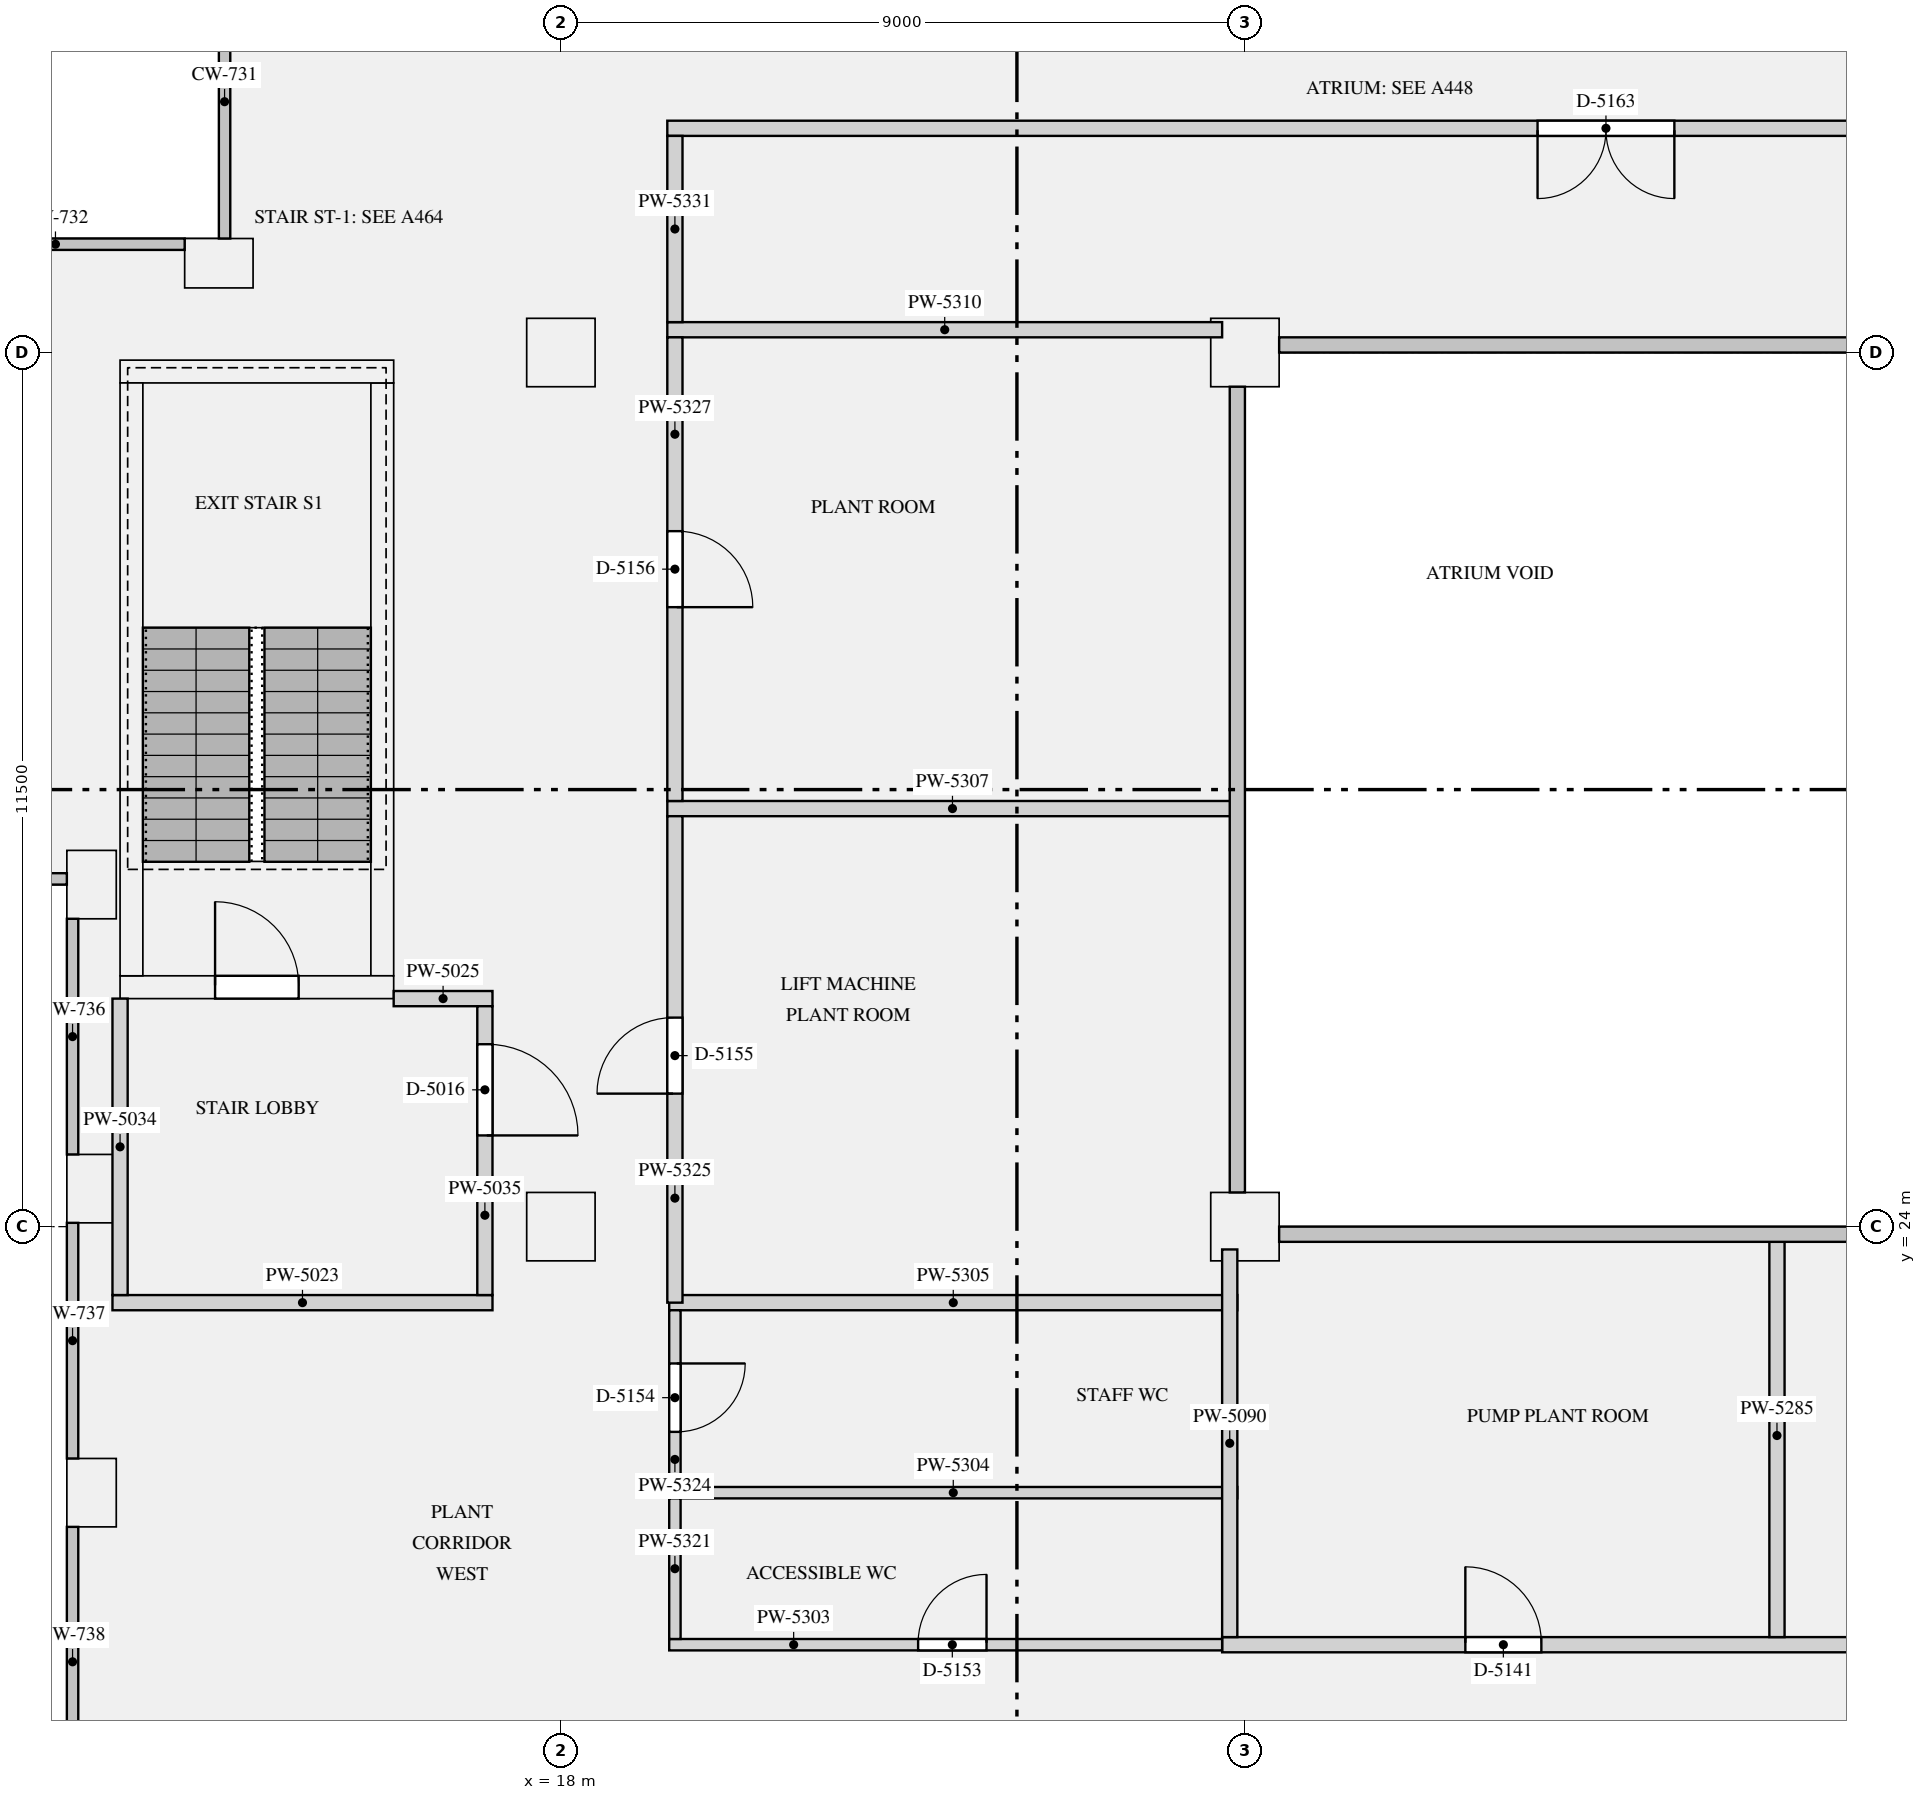
"""IFC4 building model, lengths in metres.
Left out: names, types, materials, properties, quantities, classifications, styles, units other than length and angle.
Written with IfcOpenShell. Run it as: python <this file> out.ifc"""

import sys

from ifc_helpers import new_model, si_unit, direction, frame, frame_2d, origin, origin_2d, place, context, subcontext, project, spatial, rectangle, extrude, element, fill, save


model = new_model("IFC4")
c1 = context("Model", 3, precision=1e-05, world=origin(), true_north=direction((0.0, 1.0)))
c2 = subcontext(c1, "Body", "Model", "MODEL_VIEW")
j1 = project(units=[si_unit("LENGTHUNIT", "METRE"), si_unit("PLANEANGLEUNIT", "RADIAN")], contexts=[c1])
p1 = place(None, origin())
s1 = spatial("IfcSite", under=j1, at=p1, CompositionType="ELEMENT")
p2 = place(p1, origin())
s2 = spatial("IfcBuilding", under=s1, at=p2, CompositionType="ELEMENT")
p3 = place(p2, frame((0.0, 0.0, 235.8)))
s3 = spatial("IfcBuildingStorey", under=s2, at=p3, CompositionType="ELEMENT", Elevation=235.8)
for number, where, z_axis, x_axis in (
    (1, (13.5, 36.675, 0.0), (0.0, 0.0, 1.0), (-1.0, 0.0, 0.0)),
    (2, (11.825, 28.5, 0.0), (0.0, 0.0, 1.0), (0.0, -1.0, 0.0)),
    (3, (11.825, 24.5, 0.0), (0.0, 0.0, 1.0), (0.0, -1.0, 0.0)),
    (4, (11.825, 20.5, 0.0), (0.0, 0.0, 1.0), (0.0, -1.0, 0.0)),
):
    element("IfcColumn", number, at=place(p3, frame(where, z_axis=z_axis, x_axis=x_axis)), inside=s3, PredefinedType="USERDEFINED", context=c2, shape_type="SweptSolid", body=[
        extrude(rectangle(XDim=0.9, YDim=0.65, at=origin_2d()), origin(), (0.0, 0.0, 1.0), 4.2),
    ])
for number, where, z_axis, x_axis in (
    (5, (18.0, 24.0, 0.0), (0.0, 0.0, 1.0), (1.0, 0.0, 0.0)),
    (6, (27.0, 24.0, 0.0), (0.0, 0.0, 1.0), (1.0, 0.0, 0.0)),
    (7, (18.0, 35.5, 0.0), (0.0, 0.0, 1.0), (1.0, 0.0, 0.0)),
    (8, (27.0, 35.5, 0.0), (0.0, 0.0, 1.0), (1.0, 0.0, 0.0)),
):
    element("IfcColumn", number, at=place(p3, frame(where, z_axis=z_axis, x_axis=x_axis)), inside=s3, PredefinedType="COLUMN", context=c2, shape_type="SweptSolid", body=[
        extrude(rectangle(XDim=0.9, YDim=0.9, at=origin_2d()), origin(), (0.0, 0.0, 1.0), 4.2),
    ])
p4 = place(p3, frame((12.2, 27.15, 0.0), z_axis=(0.0, 0.0, 1.0), x_axis=(1.0, 0.0, 0.0)))
e9 = element("IfcWall", 9, at=p4, inside=s3, PredefinedType="SHEAR", context=c2, shape_type="SweptSolid", body=[
    extrude(rectangle(XDim=3.6, YDim=0.3, at=frame_2d((1.8, 0.0))), origin(), (0.0, 0.0, 1.0), 4.2),
])
p5 = place(p4, frame((1.25, 0.0, 0.0)))
e10 = element("IfcOpeningElement", 10, at=p5, cuts=e9, PredefinedType="OPENING", context=c2, shape_type="SweptSolid", body=[
    extrude(rectangle(XDim=1.1, YDim=2.1, at=frame_2d((0.55, 1.05))), frame((0.0, 0.16, 0.0), z_axis=(0.0, -1.0, 0.0), x_axis=(1.0, 0.0, 0.0)), (0.0, 0.0, 1.0), 0.32),
])
p6 = place(p3, frame((12.2, 35.25, 0.0), z_axis=(0.0, 0.0, 1.0), x_axis=(1.0, 0.0, 0.0)))
e11 = element("IfcWall", 11, at=p6, inside=s3, PredefinedType="SHEAR", context=c2, shape_type="SweptSolid", body=[
    extrude(rectangle(XDim=3.6, YDim=0.3, at=frame_2d((1.8, 0.0))), origin(), (0.0, 0.0, 1.0), 4.2),
])
for number, where, z_axis, x_axis in (
    (12, (12.35, 27.3, 0.0), (0.0, 0.0, 1.0), (0.0, 1.0, 0.0)),
    (13, (15.65, 27.3, 0.0), (0.0, 0.0, 1.0), (0.0, 1.0, 0.0)),
):
    element("IfcWall", number, at=place(p3, frame(where, z_axis=z_axis, x_axis=x_axis)), inside=s3, PredefinedType="SHEAR", context=c2, shape_type="SweptSolid", body=[
        extrude(rectangle(XDim=7.8, YDim=0.3, at=frame_2d((3.9, 0.0))), origin(), (0.0, 0.0, 1.0), 4.2),
    ])
p7 = place(p3, frame((12.1, 23.0, 0.0), z_axis=(0.0, 0.0, 1.0), x_axis=(1.0, 0.0, 0.0)))
e14 = element("IfcWall", 14, at=p7, inside=s3, PredefinedType="PARTITIONING", context=c2, shape_type="SweptSolid", body=[
    extrude(rectangle(XDim=5.0, YDim=0.2, at=frame_2d((2.5, 0.0))), origin(), (0.0, 0.0, 1.0), 3.85),
])
p8 = place(p3, frame((15.8, 27.0, 0.0), z_axis=(0.0, 0.0, 1.0), x_axis=(1.0, 0.0, 0.0)))
e15 = element("IfcWall", 15, at=p8, inside=s3, PredefinedType="PARTITIONING", context=c2, shape_type="SweptSolid", body=[
    extrude(rectangle(XDim=1.3, YDim=0.2, at=frame_2d((0.65, 0.0))), origin(), (0.0, 0.0, 1.0), 3.85),
])
p9 = place(p3, frame((12.2, 23.1, 0.0), z_axis=(0.0, 0.0, 1.0), x_axis=(0.0, 1.0, 0.0)))
e16 = element("IfcWall", 16, at=p9, inside=s3, PredefinedType="PARTITIONING", context=c2, shape_type="SweptSolid", body=[
    extrude(rectangle(XDim=3.9, YDim=0.2, at=frame_2d((1.95, 0.0))), origin(), (0.0, 0.0, 1.0), 3.85),
])
p10 = place(p3, frame((17.0, 23.1, 0.0), z_axis=(0.0, 0.0, 1.0), x_axis=(0.0, 1.0, 0.0)))
e17 = element("IfcWall", 17, at=p10, inside=s3, PredefinedType="PARTITIONING", context=c2, shape_type="SweptSolid", body=[
    extrude(rectangle(XDim=3.8, YDim=0.2, at=frame_2d((1.9, 0.0))), origin(), (0.0, 0.0, 1.0), 3.85),
])
p11 = place(p10, frame((2.1, 0.0, 0.0)))
e18 = element("IfcOpeningElement", 18, at=p11, cuts=e17, PredefinedType="OPENING", context=c2, shape_type="SweptSolid", body=[
    extrude(rectangle(XDim=1.2, YDim=2.1, at=frame_2d((0.6, 1.05))), frame((0.0, 0.11, 0.0), z_axis=(0.0, -1.0, 0.0), x_axis=(1.0, 0.0, 0.0)), (0.0, 0.0, 1.0), 0.22),
])
p12 = place(p3, frame((26.7, 18.5, 0.0), z_axis=(0.0, 0.0, 1.0), x_axis=(1.0, 0.0, 0.0)))
e19 = element("IfcWall", 19, at=p12, inside=s3, PredefinedType="PARTITIONING", context=c2, shape_type="SweptSolid", body=[
    extrude(rectangle(XDim=25.9, YDim=0.2, at=frame_2d((12.95, 0.0))), origin(), (0.0, 0.0, 1.0), 3.85),
])
p13 = place(p12, frame((3.2, 0.0, 0.0)))
e20 = element("IfcOpeningElement", 20, at=p13, cuts=e19, PredefinedType="OPENING", context=c2, shape_type="SweptSolid", body=[
    extrude(rectangle(XDim=1.0, YDim=2.1, at=frame_2d((0.5, 1.05))), frame((0.0, 0.11, 0.0), z_axis=(0.0, -1.0, 0.0), x_axis=(1.0, 0.0, 0.0)), (0.0, 0.0, 1.0), 0.22),
])
p14 = place(p12, frame((12.4, 0.0, 0.0)))
e21 = element("IfcOpeningElement", 21, at=p14, cuts=e19, PredefinedType="OPENING", context=c2, shape_type="SweptSolid", body=[
    extrude(rectangle(XDim=1.0, YDim=2.1, at=frame_2d((0.5, 1.05))), frame((0.0, 0.11, 0.0), z_axis=(0.0, -1.0, 0.0), x_axis=(1.0, 0.0, 0.0)), (0.0, 0.0, 1.0), 0.22),
])
p15 = place(p3, frame((19.425, 18.5, 0.0), z_axis=(0.0, 0.0, 1.0), x_axis=(1.0, 0.0, 0.0)))
e22 = element("IfcWall", 22, at=p15, inside=s3, PredefinedType="PARTITIONING", context=c2, shape_type="SweptSolid", body=[
    extrude(rectangle(XDim=7.275, YDim=0.15, at=frame_2d((3.637, 0.0))), origin(), (0.0, 0.0, 1.0), 3.85),
])
p16 = place(p15, frame((3.275, 0.0, 0.0)))
e23 = element("IfcOpeningElement", 23, at=p16, cuts=e22, PredefinedType="OPENING", context=c2, shape_type="SweptSolid", body=[
    extrude(rectangle(XDim=0.9, YDim=2.1, at=frame_2d((0.45, 1.05))), frame((0.0, 0.085, 0.0), z_axis=(0.0, -1.0, 0.0), x_axis=(1.0, 0.0, 0.0)), (0.0, 0.0, 1.0), 0.17),
])
p17 = place(p3, frame((19.425, 20.5, 0.0), z_axis=(0.0, 0.0, 1.0), x_axis=(1.0, 0.0, 0.0)))
e24 = element("IfcWall", 24, at=p17, inside=s3, PredefinedType="PARTITIONING", context=c2, shape_type="SweptSolid", body=[
    extrude(rectangle(XDim=7.475, YDim=0.15, at=frame_2d((3.737, 0.0))), origin(), (0.0, 0.0, 1.0), 3.85),
])
p18 = place(p3, frame((19.425, 23.0, 0.0), z_axis=(0.0, 0.0, 1.0), x_axis=(1.0, 0.0, 0.0)))
e25 = element("IfcWall", 25, at=p18, inside=s3, PredefinedType="PARTITIONING", context=c2, shape_type="SweptSolid", body=[
    extrude(rectangle(XDim=7.475, YDim=0.2, at=frame_2d((3.737, 0.0))), origin(), (0.0, 0.0, 1.0), 3.85),
])
p19 = place(p3, frame((19.4, 29.5, 0.0), z_axis=(0.0, 0.0, 1.0), x_axis=(1.0, 0.0, 0.0)))
e26 = element("IfcWall", 26, at=p19, inside=s3, PredefinedType="PARTITIONING", context=c2, shape_type="SweptSolid", body=[
    extrude(rectangle(XDim=7.504, YDim=0.2, at=frame_2d((3.752, 0.0))), origin(), (0.0, 0.0, 1.0), 3.85),
])
p20 = place(p3, frame((19.4, 35.8, 0.0), z_axis=(0.0, 0.0, 1.0), x_axis=(1.0, 0.0, 0.0)))
e27 = element("IfcWall", 27, at=p20, inside=s3, PredefinedType="PARTITIONING", context=c2, shape_type="SweptSolid", body=[
    extrude(rectangle(XDim=7.3, YDim=0.2, at=frame_2d((3.65, 0.0))), origin(), (0.0, 0.0, 1.0), 3.85),
])
p21 = place(p3, frame((19.4, 38.45, 0.0), z_axis=(0.0, 0.0, 1.0), x_axis=(1.0, 0.0, 0.0)))
e28 = element("IfcWall", 28, at=p21, inside=s3, PredefinedType="PARTITIONING", context=c2, shape_type="SweptSolid", body=[
    extrude(rectangle(XDim=24.7, YDim=0.2, at=frame_2d((12.35, 0.0))), origin(), (0.0, 0.0, 1.0), 3.85),
])
p22 = place(p21, frame((11.45, 0.0, 0.0)))
e29 = element("IfcOpeningElement", 29, at=p22, cuts=e28, PredefinedType="OPENING", context=c2, shape_type="SweptSolid", body=[
    extrude(rectangle(XDim=1.8, YDim=2.1, at=frame_2d((0.9, 1.05))), frame((0.0, 0.11, 0.0), z_axis=(0.0, -1.0, 0.0), x_axis=(1.0, 0.0, 0.0)), (0.0, 0.0, 1.0), 0.22),
])
p23 = place(p3, frame((19.5, 18.575, 0.0), z_axis=(0.0, 0.0, 1.0), x_axis=(0.0, 1.0, 0.0)))
e30 = element("IfcWall", 30, at=p23, inside=s3, PredefinedType="PARTITIONING", context=c2, shape_type="SweptSolid", body=[
    extrude(rectangle(XDim=1.85, YDim=0.15, at=frame_2d((0.925, 0.0))), origin(), (0.0, 0.0, 1.0), 3.85),
])
p24 = place(p3, frame((26.8, 18.6, 0.0), z_axis=(0.0, 0.0, 1.0), x_axis=(0.0, 1.0, 0.0)))
e31 = element("IfcWall", 31, at=p24, inside=s3, PredefinedType="PARTITIONING", context=c2, shape_type="SweptSolid", body=[
    extrude(rectangle(XDim=5.1, YDim=0.2, at=frame_2d((2.55, 0.0))), origin(), (0.0, 0.0, 1.0), 3.85),
])
p25 = place(p3, frame((34.0, 18.6, 0.0), z_axis=(0.0, 0.0, 1.0), x_axis=(0.0, 1.0, 0.0)))
e32 = element("IfcWall", 32, at=p25, inside=s3, PredefinedType="PARTITIONING", context=c2, shape_type="SweptSolid", body=[
    extrude(rectangle(XDim=5.304, YDim=0.2, at=frame_2d((2.652, 0.0))), origin(), (0.0, 0.0, 1.0), 3.85),
])
p26 = place(p3, frame((19.5, 20.575, 0.0), z_axis=(0.0, 0.0, 1.0), x_axis=(0.0, 1.0, 0.0)))
e33 = element("IfcWall", 33, at=p26, inside=s3, PredefinedType="PARTITIONING", context=c2, shape_type="SweptSolid", body=[
    extrude(rectangle(XDim=2.325, YDim=0.15, at=frame_2d((1.163, 0.0))), origin(), (0.0, 0.0, 1.0), 3.85),
])
p27 = place(p26, frame((0.725, 0.0, 0.0)))
e34 = element("IfcOpeningElement", 34, at=p27, cuts=e33, PredefinedType="OPENING", context=c2, shape_type="SweptSolid", body=[
    extrude(rectangle(XDim=0.9, YDim=2.1, at=frame_2d((0.45, 1.05))), frame((0.0, 0.085, 0.0), z_axis=(0.0, -1.0, 0.0), x_axis=(1.0, 0.0, 0.0)), (0.0, 0.0, 1.0), 0.17),
])
p28 = place(p3, frame((19.5, 23.0, 0.0), z_axis=(0.0, 0.0, 1.0), x_axis=(0.0, 1.0, 0.0)))
e35 = element("IfcWall", 35, at=p28, inside=s3, PredefinedType="PARTITIONING", context=c2, shape_type="SweptSolid", body=[
    extrude(rectangle(XDim=6.4, YDim=0.2, at=frame_2d((3.2, 0.0))), origin(), (0.0, 0.0, 1.0), 3.85),
])
p29 = place(p28, frame((2.75, 0.0, 0.0)))
e36 = element("IfcOpeningElement", 36, at=p29, cuts=e35, PredefinedType="OPENING", context=c2, shape_type="SweptSolid", body=[
    extrude(rectangle(XDim=1.0, YDim=2.1, at=frame_2d((0.5, 1.05))), frame((0.0, 0.11, 0.0), z_axis=(0.0, -1.0, 0.0), x_axis=(1.0, 0.0, 0.0)), (0.0, 0.0, 1.0), 0.22),
])
p30 = place(p3, frame((19.5, 29.6, 0.0), z_axis=(0.0, 0.0, 1.0), x_axis=(0.0, 1.0, 0.0)))
e37 = element("IfcWall", 37, at=p30, inside=s3, PredefinedType="PARTITIONING", context=c2, shape_type="SweptSolid", body=[
    extrude(rectangle(XDim=6.1, YDim=0.2, at=frame_2d((3.05, 0.0))), origin(), (0.0, 0.0, 1.0), 3.85),
])
p31 = place(p30, frame((2.55, 0.0, 0.0)))
e38 = element("IfcOpeningElement", 38, at=p31, cuts=e37, PredefinedType="OPENING", context=c2, shape_type="SweptSolid", body=[
    extrude(rectangle(XDim=1.0, YDim=2.1, at=frame_2d((0.5, 1.05))), frame((0.0, 0.11, 0.0), z_axis=(0.0, -1.0, 0.0), x_axis=(1.0, 0.0, 0.0)), (0.0, 0.0, 1.0), 0.22),
])
p32 = place(p3, frame((19.5, 35.9, 0.0), z_axis=(0.0, 0.0, 1.0), x_axis=(0.0, 1.0, 0.0)))
e39 = element("IfcWall", 39, at=p32, inside=s3, PredefinedType="PARTITIONING", context=c2, shape_type="SweptSolid", body=[
    extrude(rectangle(XDim=2.45, YDim=0.2, at=frame_2d((1.225, 0.0))), origin(), (0.0, 0.0, 1.0), 3.85),
])
p33 = place(p5, origin())
e40 = element("IfcDoor", 40, at=p33, inside=s3, OperationType="SINGLE_SWING_LEFT", PredefinedType="DOOR", context=c2, shape_type="SweptSolid", body=[
    extrude(rectangle(XDim=1.1, YDim=2.1, at=frame_2d((0.55, 1.05))), frame((0.0, 0.025, 0.0), z_axis=(0.0, -1.0, 0.0), x_axis=(1.0, 0.0, 0.0)), (0.0, 0.0, 1.0), 0.05),
])
fill(e10, e40)
p34 = place(p11, frame((1.2, 0.0, 0.0), z_axis=(0.0, 0.0, 1.0), x_axis=(-1.0, 0.0, 0.0)))
e41 = element("IfcDoor", 41, at=p34, inside=s3, OperationType="SINGLE_SWING_RIGHT", PredefinedType="DOOR", context=c2, shape_type="SweptSolid", body=[
    extrude(rectangle(XDim=1.2, YDim=2.1, at=frame_2d((0.6, 1.05))), frame((0.0, 0.025, 0.0), z_axis=(0.0, -1.0, 0.0), x_axis=(1.0, 0.0, 0.0)), (0.0, 0.0, 1.0), 0.05),
])
fill(e18, e41)
p35 = place(p16, origin())
e42 = element("IfcDoor", 42, at=p35, inside=s3, OperationType="SINGLE_SWING_RIGHT", PredefinedType="DOOR", context=c2, shape_type="SweptSolid", body=[
    extrude(rectangle(XDim=0.9, YDim=2.1, at=frame_2d((0.45, 1.05))), frame((0.0, 0.025, 0.0), z_axis=(0.0, -1.0, 0.0), x_axis=(1.0, 0.0, 0.0)), (0.0, 0.0, 1.0), 0.05),
])
fill(e23, e42)
p36 = place(p27, frame((0.9, 0.0, 0.0), z_axis=(0.0, 0.0, 1.0), x_axis=(-1.0, 0.0, 0.0)))
e43 = element("IfcDoor", 43, at=p36, inside=s3, OperationType="SINGLE_SWING_LEFT", PredefinedType="DOOR", context=c2, shape_type="SweptSolid", body=[
    extrude(rectangle(XDim=0.9, YDim=2.1, at=frame_2d((0.45, 1.05))), frame((0.0, 0.025, 0.0), z_axis=(0.0, -1.0, 0.0), x_axis=(1.0, 0.0, 0.0)), (0.0, 0.0, 1.0), 0.05),
])
fill(e34, e43)
p37 = place(p29, origin())
e44 = element("IfcDoor", 44, at=p37, inside=s3, OperationType="SINGLE_SWING_LEFT", PredefinedType="DOOR", context=c2, shape_type="SweptSolid", body=[
    extrude(rectangle(XDim=1.0, YDim=2.1, at=frame_2d((0.5, 1.05))), frame((0.0, 0.025, 0.0), z_axis=(0.0, -1.0, 0.0), x_axis=(1.0, 0.0, 0.0)), (0.0, 0.0, 1.0), 0.05),
])
fill(e36, e44)
p38 = place(p31, frame((1.0, 0.0, 0.0), z_axis=(0.0, 0.0, 1.0), x_axis=(-1.0, 0.0, 0.0)))
e45 = element("IfcDoor", 45, at=p38, inside=s3, OperationType="SINGLE_SWING_RIGHT", PredefinedType="DOOR", context=c2, shape_type="SweptSolid", body=[
    extrude(rectangle(XDim=1.0, YDim=2.1, at=frame_2d((0.5, 1.05))), frame((0.0, 0.025, 0.0), z_axis=(0.0, -1.0, 0.0), x_axis=(1.0, 0.0, 0.0)), (0.0, 0.0, 1.0), 0.05),
])
fill(e38, e45)
p39 = place(p13, origin())
e46 = element("IfcDoor", 46, at=p39, inside=s3, OperationType="SINGLE_SWING_LEFT", PredefinedType="DOOR", context=c2, shape_type="SweptSolid", body=[
    extrude(rectangle(XDim=1.0, YDim=2.1, at=frame_2d((0.5, 1.05))), frame((0.0, 0.025, 0.0), z_axis=(0.0, -1.0, 0.0), x_axis=(1.0, 0.0, 0.0)), (0.0, 0.0, 1.0), 0.05),
])
fill(e20, e46)
p40 = place(p22, frame((1.8, 0.0, 0.0), z_axis=(0.0, 0.0, 1.0), x_axis=(-1.0, 0.0, 0.0)))
e47 = element("IfcDoor", 47, at=p40, inside=s3, OperationType="DOUBLE_DOOR_SINGLE_SWING", PredefinedType="DOOR", context=c2, shape_type="SweptSolid", body=[
    extrude(rectangle(XDim=1.8, YDim=2.1, at=frame_2d((0.9, 1.05))), frame((0.0, 0.025, 0.0), z_axis=(0.0, -1.0, 0.0), x_axis=(1.0, 0.0, 0.0)), (0.0, 0.0, 1.0), 0.05),
])
fill(e29, e47)
save(model, sys.argv[1])
